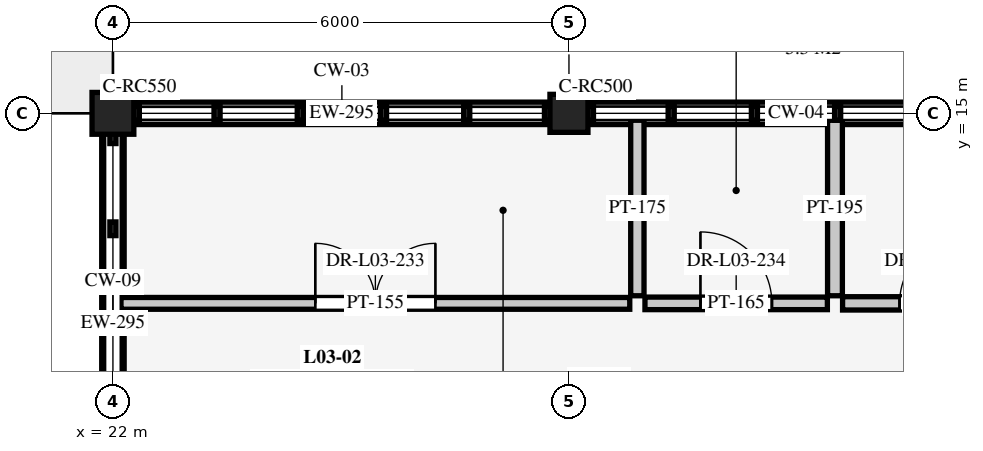
"""IFC4 building model, lengths in metres.
Left out: names, types, materials, properties, quantities, classifications, styles, units other than length and angle.
Written with IfcOpenShell. Run it as: python <this file> out.ifc"""

import sys

from ifc_helpers import new_model, si_unit, direction, frame, frame_2d, origin, origin_2d, place, context, subcontext, project, spatial, rectangle, extrude, element, fill, save


model = new_model("IFC4")
c1 = context("Model", 3, precision=1e-05, world=origin(), true_north=direction((0.0, 1.0)))
c2 = subcontext(c1, "Body", "Model", "MODEL_VIEW")
j1 = project(units=[si_unit("LENGTHUNIT", "METRE"), si_unit("PLANEANGLEUNIT", "RADIAN")], contexts=[c1])
p1 = place(None, origin())
s1 = spatial("IfcSite", under=j1, at=p1, CompositionType="ELEMENT")
p2 = place(p1, origin())
s2 = spatial("IfcBuilding", under=s1, at=p2, CompositionType="ELEMENT")
p3 = place(p2, frame((0.0, 0.0, 9.0)))
s3 = spatial("IfcBuildingStorey", under=s2, at=p3, CompositionType="ELEMENT", Elevation=9.0)
p4 = place(p3, frame((22.0, 15.0, 0.0), z_axis=(0.0, 0.0, 1.0), x_axis=(1.0, 0.0, 0.0)))
e1 = element("IfcColumn", 1, at=p4, inside=s3, PredefinedType="COLUMN", context=c2, shape_type="SweptSolid", body=[
    extrude(rectangle(XDim=0.55, YDim=0.55, at=origin_2d()), origin(), (0.0, 0.0, 1.0), 4.5),
])
p5 = place(p3, frame((28.0, 15.0, 0.0), z_axis=(0.0, 0.0, 1.0), x_axis=(1.0, 0.0, 0.0)))
e2 = element("IfcColumn", 2, at=p5, inside=s3, PredefinedType="COLUMN", context=c2, shape_type="SweptSolid", body=[
    extrude(rectangle(XDim=0.5, YDim=0.5, at=origin_2d()), origin(), (0.0, 0.0, 1.0), 4.5),
])
p6 = place(p3, frame((22.275, 15.0, 0.0), z_axis=(0.0, 0.0, 1.0), x_axis=(1.0, 0.0, 0.0)))
e3 = element("IfcWall", 3, at=p6, inside=s3, PredefinedType="SOLIDWALL", context=c2, shape_type="SweptSolid", body=[
    extrude(rectangle(XDim=5.475, YDim=0.295, at=frame_2d((2.738, 0.0))), origin(), (0.0, 0.0, 1.0), 0.26),
])
p7 = place(p3, frame((28.25, 15.0, 0.0), z_axis=(0.0, 0.0, 1.0), x_axis=(1.0, 0.0, 0.0)))
e4 = element("IfcWall", 4, at=p7, inside=s3, PredefinedType="SOLIDWALL", context=c2, shape_type="SweptSolid", body=[
    extrude(rectangle(XDim=5.475, YDim=0.295, at=frame_2d((2.738, 0.0))), origin(), (0.0, 0.0, 1.0), 0.31),
])
p8 = place(p3, frame((22.0, 9.75, 0.0), z_axis=(0.0, 0.0, 1.0), x_axis=(0.0, 1.0, 0.0)))
e5 = element("IfcWall", 5, at=p8, inside=s3, PredefinedType="SOLIDWALL", context=c2, shape_type="SweptSolid", body=[
    extrude(rectangle(XDim=4.975, YDim=0.295, at=frame_2d((2.488, 0.0))), origin(), (0.0, 0.0, 1.0), 0.16),
])
p9 = place(p3, frame((22.106, 12.5, 0.0), z_axis=(0.0, 0.0, 1.0), x_axis=(1.0, 0.0, 0.0)))
e6 = element("IfcWall", 6, at=p9, inside=s3, PredefinedType="PARTITIONING", context=c2, shape_type="SweptSolid", body=[
    extrude(rectangle(XDim=6.694, YDim=0.155, at=frame_2d((3.347, 0.0))), origin(), (0.0, 0.0, 1.0), 4.24),
])
p10 = place(p9, frame((2.557, 0.0, 0.0)))
e7 = element("IfcOpeningElement", 7, at=p10, cuts=e6, PredefinedType="OPENING", context=c2, shape_type="SweptSolid", body=[
    extrude(rectangle(XDim=1.58, YDim=2.2, at=frame_2d((0.79, 1.1))), frame((0.0, 0.088, 0.0), z_axis=(0.0, -1.0, 0.0), x_axis=(1.0, 0.0, 0.0)), (0.0, 0.0, 1.0), 0.175),
])
p11 = place(p3, frame((29.0, 12.5, 0.0), z_axis=(0.0, 0.0, 1.0), x_axis=(1.0, 0.0, 0.0)))
e8 = element("IfcWall", 8, at=p11, inside=s3, PredefinedType="PARTITIONING", context=c2, shape_type="SweptSolid", body=[
    extrude(rectangle(XDim=2.4, YDim=0.165, at=frame_2d((1.2, 0.0))), origin(), (0.0, 0.0, 1.0), 4.24),
])
p12 = place(p11, frame((0.73, 0.0, 0.0)))
e9 = element("IfcOpeningElement", 9, at=p12, cuts=e8, PredefinedType="OPENING", context=c2, shape_type="SweptSolid", body=[
    extrude(rectangle(XDim=0.94, YDim=2.1, at=frame_2d((0.47, 1.05))), frame((0.0, 0.093, 0.0), z_axis=(0.0, -1.0, 0.0), x_axis=(1.0, 0.0, 0.0)), (0.0, 0.0, 1.0), 0.185),
])
p13 = place(p3, frame((31.6, 12.5, 0.0), z_axis=(0.0, 0.0, 1.0), x_axis=(1.0, 0.0, 0.0)))
e10 = element("IfcWall", 10, at=p13, inside=s3, PredefinedType="PARTITIONING", context=c2, shape_type="SweptSolid", body=[
    extrude(rectangle(XDim=2.4, YDim=0.175, at=frame_2d((1.2, 0.0))), origin(), (0.0, 0.0, 1.0), 4.24),
])
p14 = place(p13, frame((0.75, 0.0, 0.0)))
e11 = element("IfcOpeningElement", 11, at=p14, cuts=e10, PredefinedType="OPENING", context=c2, shape_type="SweptSolid", body=[
    extrude(rectangle(XDim=0.9, YDim=2.1, at=frame_2d((0.45, 1.05))), frame((0.0, 0.097, 0.0), z_axis=(0.0, -1.0, 0.0), x_axis=(1.0, 0.0, 0.0)), (0.0, 0.0, 1.0), 0.195),
])
p15 = place(p3, frame((28.9, 12.6, 0.0), z_axis=(0.0, 0.0, 1.0), x_axis=(0.0, 1.0, 0.0)))
e12 = element("IfcWall", 12, at=p15, inside=s3, PredefinedType="PARTITIONING", context=c2, shape_type="SweptSolid", body=[
    extrude(rectangle(XDim=2.309, YDim=0.175, at=frame_2d((1.154, 0.0))), origin(), (0.0, 0.0, 1.0), 4.24),
])
p16 = place(p3, frame((31.5, 12.6, 0.0), z_axis=(0.0, 0.0, 1.0), x_axis=(0.0, 1.0, 0.0)))
e13 = element("IfcWall", 13, at=p16, inside=s3, PredefinedType="PARTITIONING", context=c2, shape_type="SweptSolid", body=[
    extrude(rectangle(XDim=2.309, YDim=0.195, at=frame_2d((1.154, 0.0))), origin(), (0.0, 0.0, 1.0), 4.24),
])
p17 = place(p10, origin())
e14 = element("IfcDoor", 14, at=p17, inside=s3, OperationType="DOUBLE_DOOR_SINGLE_SWING", PredefinedType="DOOR", context=c2, shape_type="SweptSolid", body=[
    extrude(rectangle(XDim=1.58, YDim=2.2, at=frame_2d((0.79, 1.1))), frame((0.0, 0.025, 0.0), z_axis=(0.0, -1.0, 0.0), x_axis=(1.0, 0.0, 0.0)), (0.0, 0.0, 1.0), 0.05),
])
fill(e7, e14)
p18 = place(p12, origin())
e15 = element("IfcDoor", 15, at=p18, inside=s3, OperationType="SINGLE_SWING_LEFT", PredefinedType="DOOR", context=c2, shape_type="SweptSolid", body=[
    extrude(rectangle(XDim=0.94, YDim=2.1, at=frame_2d((0.47, 1.05))), frame((0.0, 0.025, 0.0), z_axis=(0.0, -1.0, 0.0), x_axis=(1.0, 0.0, 0.0)), (0.0, 0.0, 1.0), 0.05),
])
fill(e9, e15)
p19 = place(p14, origin())
e16 = element("IfcDoor", 16, at=p19, inside=s3, OperationType="SINGLE_SWING_RIGHT", PredefinedType="DOOR", context=c2, shape_type="SweptSolid", body=[
    extrude(rectangle(XDim=0.9, YDim=2.1, at=frame_2d((0.45, 1.05))), frame((0.0, 0.025, 0.0), z_axis=(0.0, -1.0, 0.0), x_axis=(1.0, 0.0, 0.0)), (0.0, 0.0, 1.0), 0.05),
])
fill(e11, e16)
save(model, sys.argv[1])
